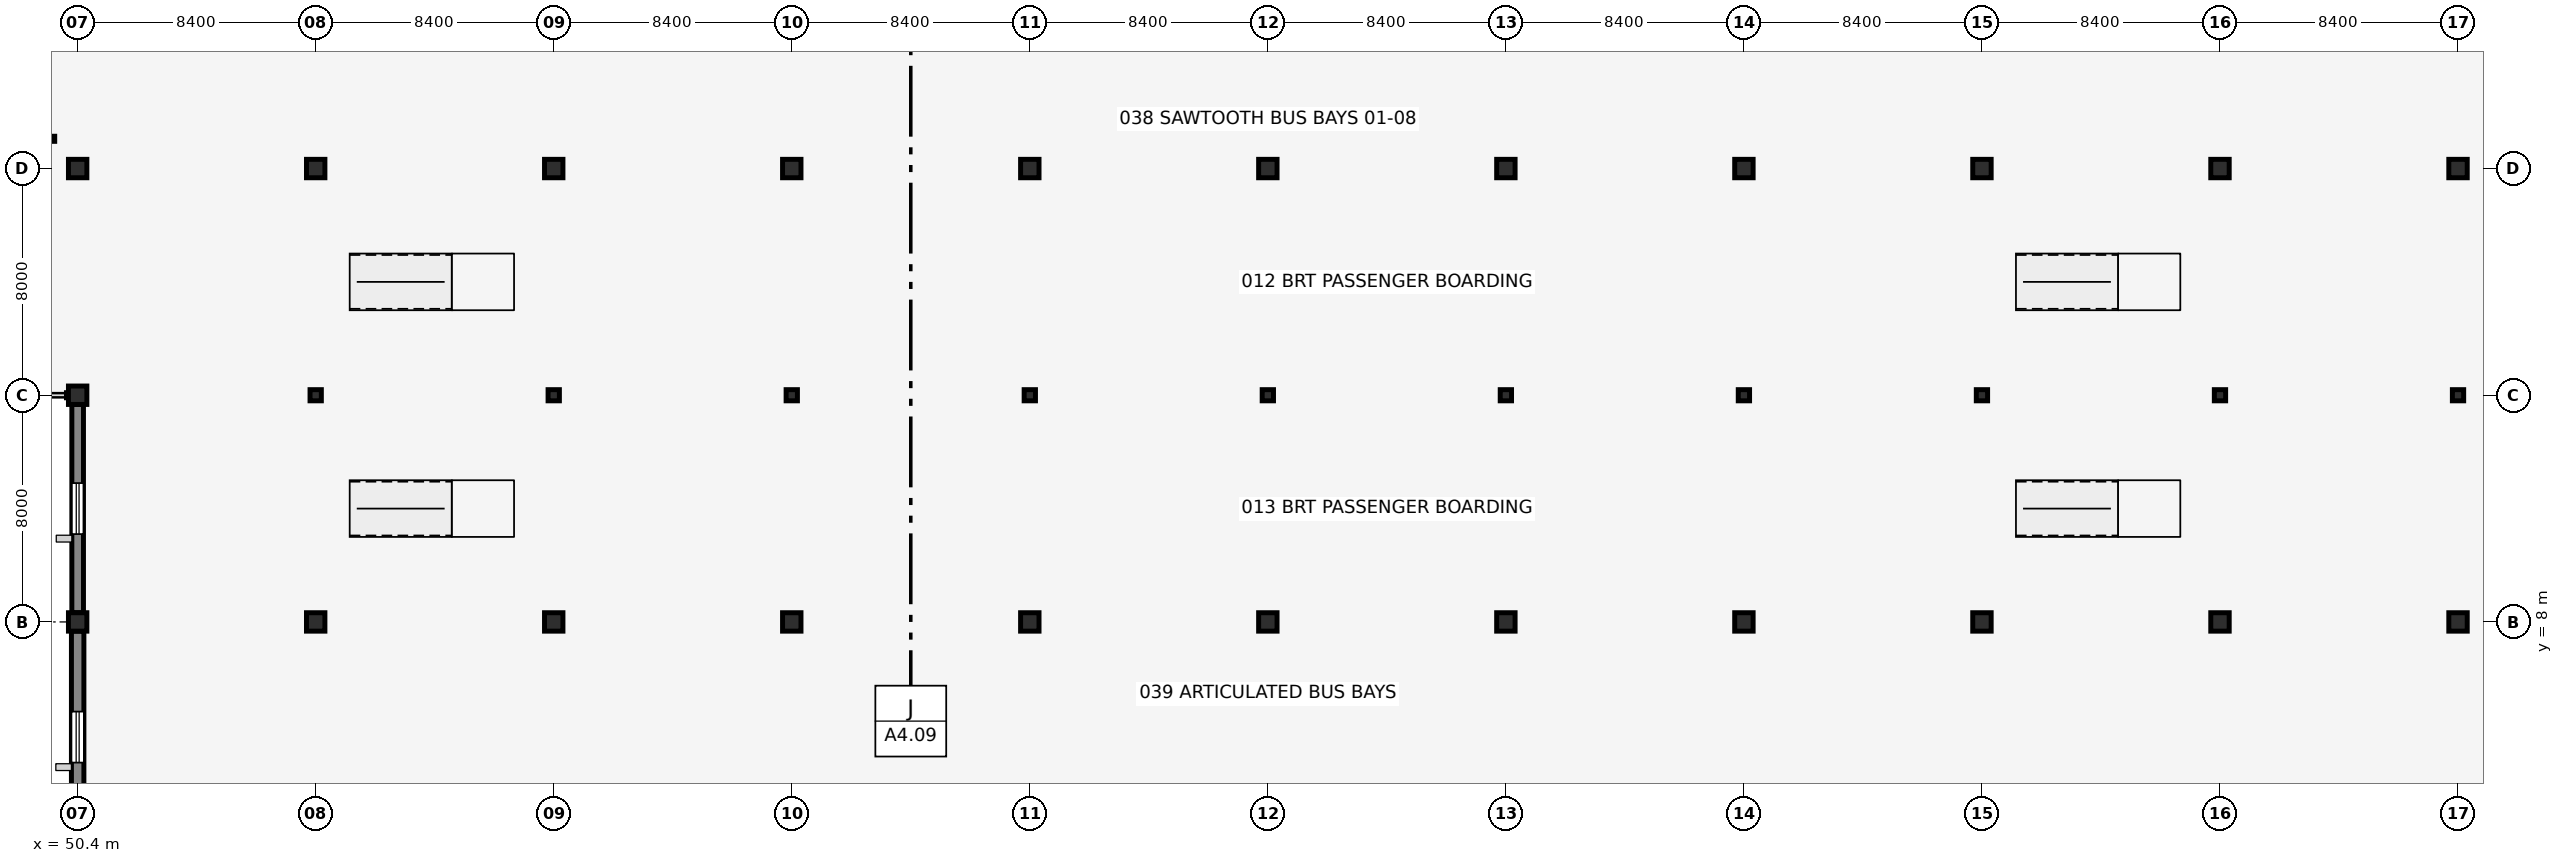
"""IFC4 building model, lengths in metres.
Left out: names, types, materials, properties, quantities, classifications, styles, units other than length and angle.
Written with IfcOpenShell. Run it as: python <this file> out.ifc"""

import sys

from ifc_helpers import new_model, si_unit, direction, frame, frame_2d, origin, origin_2d, place, context, subcontext, project, spatial, rectangle, hollow_rectangle, circle, i_section, extrude, element, fill, save


model = new_model("IFC4")
c1 = context("Model", 3, precision=1e-05, world=origin(), true_north=direction((0.0, 1.0)))
c2 = subcontext(c1, "Body", "Model", "MODEL_VIEW")
j1 = project(units=[si_unit("LENGTHUNIT", "METRE"), si_unit("PLANEANGLEUNIT", "RADIAN")], contexts=[c1])
p1 = place(None, origin())
s1 = spatial("IfcSite", under=j1, at=p1, CompositionType="ELEMENT")
p2 = place(p1, origin())
s2 = spatial("IfcBuilding", under=s1, at=p2, CompositionType="ELEMENT")
p3 = place(p2, origin())
s3 = spatial("IfcBuildingStorey", under=s2, at=p3, CompositionType="ELEMENT", Elevation=0.0)
p4 = place(p3, frame((50.4, 8.0, 0.0), z_axis=(0.0, 0.0, 1.0), x_axis=(1.0, 0.0, 0.0)))
e1 = element("IfcColumn", 1, at=p4, inside=s3, PredefinedType="COLUMN", context=c2, shape_type="SweptSolid", body=[
    extrude(circle(Radius=0.325, at=origin_2d()), origin(), (0.0, 0.0, 1.0), 5.15),
])
for number, where, z_axis, x_axis in (
    (2, (50.4, 16.0, 0.0), (0.0, 0.0, 1.0), (1.0, 0.0, 0.0)),
    (3, (50.4, 24.0, 0.0), (0.0, 0.0, 1.0), (1.0, 0.0, 0.0)),
):
    element("IfcColumn", number, at=place(p3, frame(where, z_axis=z_axis, x_axis=x_axis)), inside=s3, PredefinedType="COLUMN", context=c2, shape_type="SweptSolid", body=[
        extrude(rectangle(XDim=0.65, YDim=0.65, at=origin_2d()), origin(), (0.0, 0.0, 1.0), 5.15),
    ])
p5 = place(p3, frame((58.8, 8.0, 0.0), z_axis=(0.0, 0.0, 1.0), x_axis=(1.0, 0.0, 0.0)))
e4 = element("IfcColumn", 4, at=p5, inside=s3, PredefinedType="COLUMN", context=c2, shape_type="SweptSolid", body=[
    extrude(circle(Radius=0.325, at=origin_2d()), origin(), (0.0, 0.0, 1.0), 5.15),
])
p6 = place(p3, frame((58.8, 16.0, 0.0), z_axis=(0.0, 0.0, 1.0), x_axis=(1.0, 0.0, 0.0)))
e5 = element("IfcColumn", 5, at=p6, inside=s3, PredefinedType="COLUMN", context=c2, shape_type="SweptSolid", body=[
    extrude(i_section(OverallWidth=0.399, OverallDepth=0.394, WebThickness=0.023, FlangeThickness=0.037, FilletRadius=0.015, at=origin_2d()), origin(), (0.0, 0.0, 1.0), 5.15),
])
p7 = place(p3, frame((58.8, 24.0, 0.0), z_axis=(0.0, 0.0, 1.0), x_axis=(1.0, 0.0, 0.0)))
e6 = element("IfcColumn", 6, at=p7, inside=s3, PredefinedType="COLUMN", context=c2, shape_type="SweptSolid", body=[
    extrude(rectangle(XDim=0.65, YDim=0.65, at=origin_2d()), origin(), (0.0, 0.0, 1.0), 5.15),
])
p8 = place(p3, frame((67.2, 8.0, 0.0), z_axis=(0.0, 0.0, 1.0), x_axis=(1.0, 0.0, 0.0)))
e7 = element("IfcColumn", 7, at=p8, inside=s3, PredefinedType="COLUMN", context=c2, shape_type="SweptSolid", body=[
    extrude(circle(Radius=0.325, at=origin_2d()), origin(), (0.0, 0.0, 1.0), 5.15),
])
p9 = place(p3, frame((67.2, 16.0, 0.0), z_axis=(0.0, 0.0, 1.0), x_axis=(1.0, 0.0, 0.0)))
e8 = element("IfcColumn", 8, at=p9, inside=s3, PredefinedType="COLUMN", context=c2, shape_type="SweptSolid", body=[
    extrude(i_section(OverallWidth=0.399, OverallDepth=0.394, WebThickness=0.023, FlangeThickness=0.037, FilletRadius=0.015, at=origin_2d()), origin(), (0.0, 0.0, 1.0), 5.15),
])
p10 = place(p3, frame((67.2, 24.0, 0.0), z_axis=(0.0, 0.0, 1.0), x_axis=(1.0, 0.0, 0.0)))
e9 = element("IfcColumn", 9, at=p10, inside=s3, PredefinedType="COLUMN", context=c2, shape_type="SweptSolid", body=[
    extrude(rectangle(XDim=0.65, YDim=0.65, at=origin_2d()), origin(), (0.0, 0.0, 1.0), 5.15),
])
p11 = place(p3, frame((75.6, 8.0, 0.0), z_axis=(0.0, 0.0, 1.0), x_axis=(1.0, 0.0, 0.0)))
e10 = element("IfcColumn", 10, at=p11, inside=s3, PredefinedType="COLUMN", context=c2, shape_type="SweptSolid", body=[
    extrude(circle(Radius=0.325, at=origin_2d()), origin(), (0.0, 0.0, 1.0), 5.15),
])
p12 = place(p3, frame((75.6, 16.0, 0.0), z_axis=(0.0, 0.0, 1.0), x_axis=(1.0, 0.0, 0.0)))
e11 = element("IfcColumn", 11, at=p12, inside=s3, PredefinedType="COLUMN", context=c2, shape_type="SweptSolid", body=[
    extrude(i_section(OverallWidth=0.399, OverallDepth=0.394, WebThickness=0.023, FlangeThickness=0.037, FilletRadius=0.015, at=origin_2d()), origin(), (0.0, 0.0, 1.0), 5.15),
])
p13 = place(p3, frame((75.6, 24.0, 0.0), z_axis=(0.0, 0.0, 1.0), x_axis=(1.0, 0.0, 0.0)))
e12 = element("IfcColumn", 12, at=p13, inside=s3, PredefinedType="COLUMN", context=c2, shape_type="SweptSolid", body=[
    extrude(rectangle(XDim=0.65, YDim=0.65, at=origin_2d()), origin(), (0.0, 0.0, 1.0), 5.15),
])
p14 = place(p3, frame((84.0, 8.0, 0.0), z_axis=(0.0, 0.0, 1.0), x_axis=(1.0, 0.0, 0.0)))
e13 = element("IfcColumn", 13, at=p14, inside=s3, PredefinedType="COLUMN", context=c2, shape_type="SweptSolid", body=[
    extrude(circle(Radius=0.325, at=origin_2d()), origin(), (0.0, 0.0, 1.0), 5.15),
])
p15 = place(p3, frame((84.0, 16.0, 0.0), z_axis=(0.0, 0.0, 1.0), x_axis=(1.0, 0.0, 0.0)))
e14 = element("IfcColumn", 14, at=p15, inside=s3, PredefinedType="COLUMN", context=c2, shape_type="SweptSolid", body=[
    extrude(i_section(OverallWidth=0.399, OverallDepth=0.394, WebThickness=0.023, FlangeThickness=0.037, FilletRadius=0.015, at=origin_2d()), origin(), (0.0, 0.0, 1.0), 5.15),
])
for number, where, z_axis, x_axis in (
    (15, (84.0, 24.0, 0.0), (0.0, 0.0, 1.0), (1.0, 0.0, 0.0)),
    (16, (92.4, 8.0, 0.0), (0.0, 0.0, 1.0), (1.0, 0.0, 0.0)),
):
    element("IfcColumn", number, at=place(p3, frame(where, z_axis=z_axis, x_axis=x_axis)), inside=s3, PredefinedType="COLUMN", context=c2, shape_type="SweptSolid", body=[
        extrude(circle(Radius=0.325, at=origin_2d()), origin(), (0.0, 0.0, 1.0), 5.15),
    ])
p16 = place(p3, frame((92.4, 16.0, 0.0), z_axis=(0.0, 0.0, 1.0), x_axis=(1.0, 0.0, 0.0)))
e17 = element("IfcColumn", 17, at=p16, inside=s3, PredefinedType="COLUMN", context=c2, shape_type="SweptSolid", body=[
    extrude(i_section(OverallWidth=0.399, OverallDepth=0.394, WebThickness=0.023, FlangeThickness=0.037, FilletRadius=0.015, at=origin_2d()), origin(), (0.0, 0.0, 1.0), 5.15),
])
for number, where, z_axis, x_axis in (
    (18, (92.4, 24.0, 0.0), (0.0, 0.0, 1.0), (1.0, 0.0, 0.0)),
    (19, (100.8, 8.0, 0.0), (0.0, 0.0, 1.0), (1.0, 0.0, 0.0)),
):
    element("IfcColumn", number, at=place(p3, frame(where, z_axis=z_axis, x_axis=x_axis)), inside=s3, PredefinedType="COLUMN", context=c2, shape_type="SweptSolid", body=[
        extrude(circle(Radius=0.325, at=origin_2d()), origin(), (0.0, 0.0, 1.0), 5.15),
    ])
p17 = place(p3, frame((100.8, 16.0, 0.0), z_axis=(0.0, 0.0, 1.0), x_axis=(1.0, 0.0, 0.0)))
e20 = element("IfcColumn", 20, at=p17, inside=s3, PredefinedType="COLUMN", context=c2, shape_type="SweptSolid", body=[
    extrude(i_section(OverallWidth=0.399, OverallDepth=0.394, WebThickness=0.023, FlangeThickness=0.037, FilletRadius=0.015, at=origin_2d()), origin(), (0.0, 0.0, 1.0), 5.15),
])
for number, where, z_axis, x_axis in (
    (21, (100.8, 24.0, 0.0), (0.0, 0.0, 1.0), (1.0, 0.0, 0.0)),
    (22, (109.2, 8.0, 0.0), (0.0, 0.0, 1.0), (1.0, 0.0, 0.0)),
):
    element("IfcColumn", number, at=place(p3, frame(where, z_axis=z_axis, x_axis=x_axis)), inside=s3, PredefinedType="COLUMN", context=c2, shape_type="SweptSolid", body=[
        extrude(circle(Radius=0.325, at=origin_2d()), origin(), (0.0, 0.0, 1.0), 5.15),
    ])
p18 = place(p3, frame((109.2, 16.0, 0.0), z_axis=(0.0, 0.0, 1.0), x_axis=(1.0, 0.0, 0.0)))
e23 = element("IfcColumn", 23, at=p18, inside=s3, PredefinedType="COLUMN", context=c2, shape_type="SweptSolid", body=[
    extrude(i_section(OverallWidth=0.399, OverallDepth=0.394, WebThickness=0.023, FlangeThickness=0.037, FilletRadius=0.015, at=origin_2d()), origin(), (0.0, 0.0, 1.0), 5.15),
])
for number, where, z_axis, x_axis in (
    (24, (109.2, 24.0, 0.0), (0.0, 0.0, 1.0), (1.0, 0.0, 0.0)),
    (25, (117.6, 8.0, 0.0), (0.0, 0.0, 1.0), (1.0, 0.0, 0.0)),
):
    element("IfcColumn", number, at=place(p3, frame(where, z_axis=z_axis, x_axis=x_axis)), inside=s3, PredefinedType="COLUMN", context=c2, shape_type="SweptSolid", body=[
        extrude(circle(Radius=0.325, at=origin_2d()), origin(), (0.0, 0.0, 1.0), 5.15),
    ])
p19 = place(p3, frame((117.6, 16.0, 0.0), z_axis=(0.0, 0.0, 1.0), x_axis=(1.0, 0.0, 0.0)))
e26 = element("IfcColumn", 26, at=p19, inside=s3, PredefinedType="COLUMN", context=c2, shape_type="SweptSolid", body=[
    extrude(i_section(OverallWidth=0.399, OverallDepth=0.394, WebThickness=0.023, FlangeThickness=0.037, FilletRadius=0.015, at=origin_2d()), origin(), (0.0, 0.0, 1.0), 5.15),
])
for number, where, z_axis, x_axis in (
    (27, (117.6, 24.0, 0.0), (0.0, 0.0, 1.0), (1.0, 0.0, 0.0)),
    (28, (126.0, 8.0, 0.0), (0.0, 0.0, 1.0), (1.0, 0.0, 0.0)),
):
    element("IfcColumn", number, at=place(p3, frame(where, z_axis=z_axis, x_axis=x_axis)), inside=s3, PredefinedType="COLUMN", context=c2, shape_type="SweptSolid", body=[
        extrude(circle(Radius=0.325, at=origin_2d()), origin(), (0.0, 0.0, 1.0), 5.15),
    ])
p20 = place(p3, frame((126.0, 16.0, 0.0), z_axis=(0.0, 0.0, 1.0), x_axis=(1.0, 0.0, 0.0)))
e29 = element("IfcColumn", 29, at=p20, inside=s3, PredefinedType="COLUMN", context=c2, shape_type="SweptSolid", body=[
    extrude(i_section(OverallWidth=0.399, OverallDepth=0.394, WebThickness=0.023, FlangeThickness=0.037, FilletRadius=0.015, at=origin_2d()), origin(), (0.0, 0.0, 1.0), 5.15),
])
for number, where, z_axis, x_axis in (
    (30, (126.0, 24.0, 0.0), (0.0, 0.0, 1.0), (1.0, 0.0, 0.0)),
    (31, (134.4, 8.0, 0.0), (0.0, 0.0, 1.0), (1.0, 0.0, 0.0)),
):
    element("IfcColumn", number, at=place(p3, frame(where, z_axis=z_axis, x_axis=x_axis)), inside=s3, PredefinedType="COLUMN", context=c2, shape_type="SweptSolid", body=[
        extrude(circle(Radius=0.325, at=origin_2d()), origin(), (0.0, 0.0, 1.0), 5.15),
    ])
p21 = place(p3, frame((134.4, 16.0, 0.0), z_axis=(0.0, 0.0, 1.0), x_axis=(1.0, 0.0, 0.0)))
e32 = element("IfcColumn", 32, at=p21, inside=s3, PredefinedType="COLUMN", context=c2, shape_type="SweptSolid", body=[
    extrude(i_section(OverallWidth=0.399, OverallDepth=0.394, WebThickness=0.023, FlangeThickness=0.037, FilletRadius=0.015, at=origin_2d()), origin(), (0.0, 0.0, 1.0), 5.15),
])
p22 = place(p3, frame((134.4, 24.0, 0.0), z_axis=(0.0, 0.0, 1.0), x_axis=(1.0, 0.0, 0.0)))
e33 = element("IfcColumn", 33, at=p22, inside=s3, PredefinedType="COLUMN", context=c2, shape_type="SweptSolid", body=[
    extrude(circle(Radius=0.325, at=origin_2d()), origin(), (0.0, 0.0, 1.0), 5.15),
])
p23 = place(p3, frame((50.4, 0.197, 0.0), z_axis=(0.0, 0.0, 1.0), x_axis=(0.0, 1.0, 0.0)))
e34 = element("IfcWall", 34, at=p23, inside=s3, PredefinedType="SOLIDWALL", context=c2, shape_type="SweptSolid", body=[
    extrude(rectangle(XDim=7.478, YDim=0.44, at=frame_2d((3.739, 0.0))), origin(), (0.0, 0.0, 1.0), 4.747),
])
p24 = place(p23, frame((2.839, 0.0, 0.9), z_axis=(0.0, 0.0, 1.0), x_axis=(1.0, 0.0, 0.0)))
e35 = element("IfcOpeningElement", 35, at=p24, cuts=e34, PredefinedType="OPENING", context=c2, shape_type="SweptSolid", body=[
    extrude(rectangle(XDim=1.8, YDim=1.45, at=frame_2d((0.9, 0.725))), frame((0.0, 0.23, 0.0), z_axis=(0.0, -1.0, 0.0), x_axis=(1.0, 0.0, 0.0)), (0.0, 0.0, 1.0), 0.46),
])
p25 = place(p3, frame((50.4, 8.325, 0.0), z_axis=(0.0, 0.0, 1.0), x_axis=(0.0, 1.0, 0.0)))
e36 = element("IfcWall", 36, at=p25, inside=s3, PredefinedType="SOLIDWALL", context=c2, shape_type="SweptSolid", body=[
    extrude(rectangle(XDim=7.35, YDim=0.41, at=frame_2d((3.675, 0.0))), origin(), (0.0, 0.0, 1.0), 4.747),
])
p26 = place(p25, frame((2.775, 0.0, 0.9), z_axis=(0.0, 0.0, 1.0), x_axis=(1.0, 0.0, 0.0)))
e37 = element("IfcOpeningElement", 37, at=p26, cuts=e36, PredefinedType="OPENING", context=c2, shape_type="SweptSolid", body=[
    extrude(rectangle(XDim=1.8, YDim=1.3, at=frame_2d((0.9, 0.65))), frame((0.0, 0.215, 0.0), z_axis=(0.0, -1.0, 0.0), x_axis=(1.0, 0.0, 0.0)), (0.0, 0.0, 1.0), 0.43),
])
p27 = place(p3, frame((49.5, 25.05, 0.0), z_axis=(0.0, 0.0, 1.0), x_axis=(1.0, 0.0, 0.0)))
e38 = element("IfcColumn", 38, at=p27, inside=s3, PredefinedType="COLUMN", context=c2, shape_type="SweptSolid", body=[
    extrude(hollow_rectangle(XDim=0.18, YDim=0.18, WallThickness=0.008, InnerFilletRadius=0.012, OuterFilletRadius=0.02, at=origin_2d()), origin(), (0.0, 0.0, 1.0), 5.15),
])
p28 = place(p24, origin())
e39 = element("IfcWindow", 39, at=p28, inside=s3, PartitioningType="DOUBLE_PANEL_VERTICAL", PredefinedType="WINDOW", context=c2, shape_type="SweptSolid", body=[
    extrude(rectangle(XDim=1.8, YDim=1.45, at=frame_2d((0.9, 0.725))), frame((0.0, 0.03, 0.0), z_axis=(0.0, -1.0, 0.0), x_axis=(1.0, 0.0, 0.0)), (0.0, 0.0, 1.0), 0.06),
])
fill(e35, e39)
p29 = place(p26, origin())
e40 = element("IfcWindow", 40, at=p29, inside=s3, PartitioningType="DOUBLE_PANEL_VERTICAL", PredefinedType="WINDOW", context=c2, shape_type="SweptSolid", body=[
    extrude(rectangle(XDim=1.8, YDim=1.3, at=frame_2d((0.9, 0.65))), frame((0.0, 0.03, 0.0), z_axis=(0.0, -1.0, 0.0), x_axis=(1.0, 0.0, 0.0)), (0.0, 0.0, 1.0), 0.06),
])
fill(e37, e40)
save(model, sys.argv[1])
